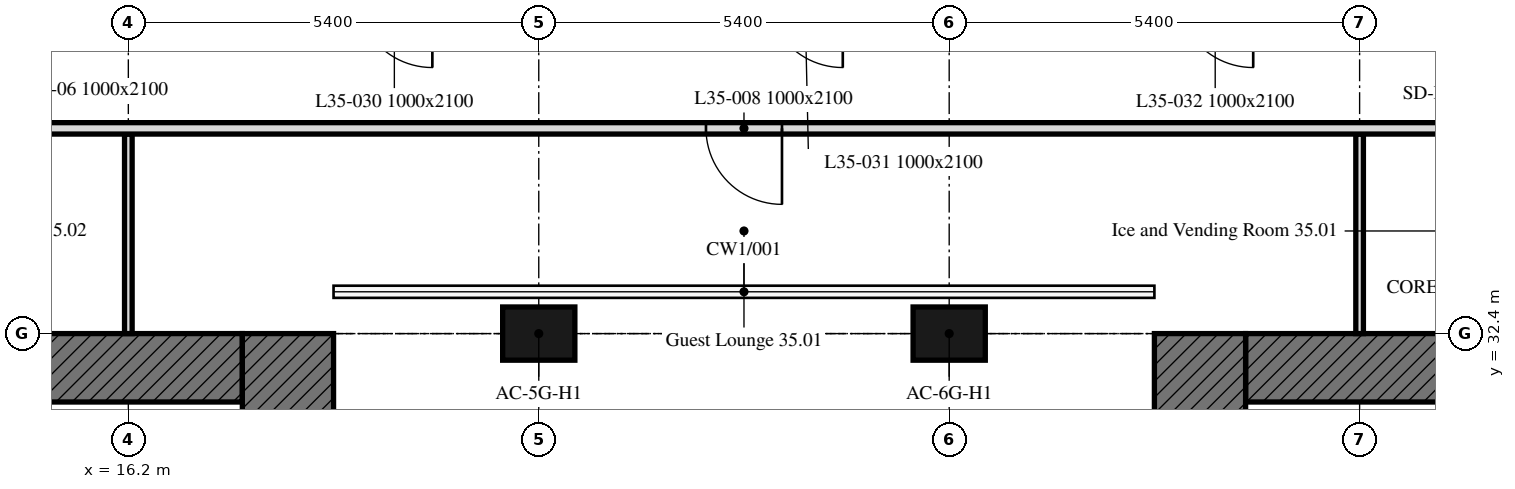
"""IFC4 building model, lengths in metres.
Left out: names, types, materials, properties, quantities, classifications, styles, units other than length and angle.
Written with IfcOpenShell. Run it as: python <this file> out.ifc"""

import sys

from ifc_helpers import new_model, si_unit, direction, frame, frame_2d, origin, origin_2d, place, context, subcontext, project, spatial, rectangle, extrude, element, fill, save


model = new_model("IFC4")
c1 = context("Model", 3, precision=1e-05, world=origin(), true_north=direction((0.0, 1.0)))
c2 = subcontext(c1, "Body", "Model", "MODEL_VIEW")
j1 = project(units=[si_unit("LENGTHUNIT", "METRE"), si_unit("PLANEANGLEUNIT", "RADIAN")], contexts=[c1])
p1 = place(None, origin())
s1 = spatial("IfcSite", under=j1, at=p1, CompositionType="ELEMENT")
p2 = place(p1, origin())
s2 = spatial("IfcBuilding", under=s1, at=p2, CompositionType="ELEMENT")
p3 = place(p2, frame((0.0, 0.0, 152.8)))
s3 = spatial("IfcBuildingStorey", under=s2, at=p3, CompositionType="ELEMENT", Elevation=152.8)
for number, where, z_axis, x_axis in (
    (1, (21.6, 32.4, 0.0), (0.0, 0.0, 1.0), (1.0, 0.0, 0.0)),
    (2, (27.0, 32.4, 0.0), (0.0, 0.0, 1.0), (1.0, 0.0, 0.0)),
):
    element("IfcColumn", number, at=place(p3, frame(where, z_axis=z_axis, x_axis=x_axis)), inside=s3, PredefinedType="COLUMN", context=c2, shape_type="SweptSolid", body=[
        extrude(rectangle(XDim=0.95, YDim=0.7, at=origin_2d()), origin(), (0.0, 0.0, 1.0), 3.0),
    ])
p4 = place(p3, frame((6.6, 31.95, 0.0), z_axis=(0.0, 0.0, 1.0), x_axis=(1.0, 0.0, 0.0)))
e3 = element("IfcWall", 3, at=p4, inside=s3, PredefinedType="SOLIDWALL", context=c2, shape_type="SweptSolid", body=[
    extrude(rectangle(XDim=11.1, YDim=0.9, at=frame_2d((5.55, 0.0))), origin(), (0.0, 0.0, 1.0), 3.0),
])
p5 = place(p4, frame((3.55, 0.0, 0.0)))
e4 = element("IfcOpeningElement", 4, at=p5, cuts=e3, PredefinedType="OPENING", context=c2, shape_type="SweptSolid", body=[
    extrude(rectangle(XDim=2.0, YDim=2.4, at=frame_2d((1.0, 1.2))), frame((0.0, 0.45, 0.0), z_axis=(0.0, -1.0, 0.0), x_axis=(1.0, 0.0, 0.0)), (0.0, 0.0, 1.0), 0.9),
])
p6 = place(p3, frame((18.3, 32.4, 0.0), z_axis=(0.0, 0.0, 1.0), x_axis=(0.0, -1.0, 0.0)))
e5 = element("IfcWall", 5, at=p6, inside=s3, PredefinedType="SOLIDWALL", context=c2, shape_type="SweptSolid", body=[
    extrude(rectangle(XDim=16.2, YDim=1.2, at=frame_2d((8.1, 0.0))), origin(), (0.0, 0.0, 1.0), 3.0),
])
p7 = place(p3, frame((30.9, 31.95, 0.0), z_axis=(0.0, 0.0, 1.0), x_axis=(1.0, 0.0, 0.0)))
e6 = element("IfcWall", 6, at=p7, inside=s3, PredefinedType="SOLIDWALL", context=c2, shape_type="SweptSolid", body=[
    extrude(rectangle(XDim=11.1, YDim=0.9, at=frame_2d((5.55, 0.0))), origin(), (0.0, 0.0, 1.0), 3.0),
])
p8 = place(p7, frame((5.55, 0.0, 0.0)))
e7 = element("IfcOpeningElement", 7, at=p8, cuts=e6, PredefinedType="OPENING", context=c2, shape_type="SweptSolid", body=[
    extrude(rectangle(XDim=2.0, YDim=2.4, at=frame_2d((1.0, 1.2))), frame((0.0, 0.45, 0.0), z_axis=(0.0, -1.0, 0.0), x_axis=(1.0, 0.0, 0.0)), (0.0, 0.0, 1.0), 0.9),
])
p9 = place(p3, frame((30.3, 16.2, 0.0), z_axis=(0.0, 0.0, 1.0), x_axis=(0.0, 1.0, 0.0)))
e8 = element("IfcWall", 8, at=p9, inside=s3, PredefinedType="SOLIDWALL", context=c2, shape_type="SweptSolid", body=[
    extrude(rectangle(XDim=16.2, YDim=1.2, at=frame_2d((8.1, 0.0))), origin(), (0.0, 0.0, 1.0), 3.0),
])
for number, where, z_axis, x_axis in (
    (9, (32.4, 32.4, 0.0), (0.0, 0.0, 1.0), (0.0, 1.0, 0.0)),
    (10, (16.2, 35.025, 0.0), (0.0, 0.0, 1.0), (0.0, -1.0, 0.0)),
):
    element("IfcWall", number, at=place(p3, frame(where, z_axis=z_axis, x_axis=x_axis)), inside=s3, PredefinedType="PARTITIONING", context=c2, shape_type="SweptSolid", body=[
        extrude(rectangle(XDim=2.625, YDim=0.1, at=frame_2d((1.312, 0.0))), origin(), (0.0, 0.0, 1.0), 3.0),
    ])
p10 = place(p3, frame((43.275, 35.1, 0.0), z_axis=(0.0, 0.0, 1.0), x_axis=(-1.0, 0.0, 0.0)))
e11 = element("IfcWall", 11, at=p10, inside=s3, PredefinedType="PARTITIONING", context=c2, shape_type="SweptSolid", body=[
    extrude(rectangle(XDim=37.124, YDim=0.15, at=frame_2d((18.562, 0.0))), origin(), (0.0, 0.0, 1.0), 3.0),
])
p11 = place(p10, frame((18.475, 0.0, 0.0)))
e12 = element("IfcOpeningElement", 12, at=p11, cuts=e11, PredefinedType="OPENING", context=c2, shape_type="SweptSolid", body=[
    extrude(rectangle(XDim=1.0, YDim=2.1, at=frame_2d((0.5, 1.05))), frame((0.0, 0.075, 0.0), z_axis=(0.0, -1.0, 0.0), x_axis=(1.0, 0.0, 0.0)), (0.0, 0.0, 1.0), 0.15),
])
p12 = place(p10, frame((34.095, 0.0, 0.0)))
e13 = element("IfcOpeningElement", 13, at=p12, cuts=e11, PredefinedType="OPENING", context=c2, shape_type="SweptSolid", body=[
    extrude(rectangle(XDim=1.0, YDim=2.1, at=frame_2d((0.5, 1.05))), frame((0.0, 0.075, 0.0), z_axis=(0.0, -1.0, 0.0), x_axis=(1.0, 0.0, 0.0)), (0.0, 0.0, 1.0), 0.15),
])
p13 = place(p10, frame((8.75, 0.0, 0.0)))
e14 = element("IfcOpeningElement", 14, at=p13, cuts=e11, PredefinedType="OPENING", context=c2, shape_type="SweptSolid", body=[
    extrude(rectangle(XDim=1.0, YDim=2.1, at=frame_2d((0.5, 1.05))), frame((0.0, 0.075, 0.0), z_axis=(0.0, -1.0, 0.0), x_axis=(1.0, 0.0, 0.0)), (0.0, 0.0, 1.0), 0.15),
])
p14 = place(p10, frame((1.55, 0.0, 0.0)))
e15 = element("IfcOpeningElement", 15, at=p14, cuts=e11, PredefinedType="OPENING", context=c2, shape_type="SweptSolid", body=[
    extrude(rectangle(XDim=1.0, YDim=2.1, at=frame_2d((0.5, 1.05))), frame((0.0, 0.075, 0.0), z_axis=(0.0, -1.0, 0.0), x_axis=(1.0, 0.0, 0.0)), (0.0, 0.0, 1.0), 0.15),
])
p15 = place(p10, frame((28.2, 0.0, 0.0)))
e16 = element("IfcOpeningElement", 16, at=p15, cuts=e11, PredefinedType="OPENING", context=c2, shape_type="SweptSolid", body=[
    extrude(rectangle(XDim=1.0, YDim=2.1, at=frame_2d((0.5, 1.05))), frame((0.0, 0.075, 0.0), z_axis=(0.0, -1.0, 0.0), x_axis=(1.0, 0.0, 0.0)), (0.0, 0.0, 1.0), 0.15),
])
p16 = place(p10, frame((30.625, 0.0, 0.0)))
e17 = element("IfcOpeningElement", 17, at=p16, cuts=e11, PredefinedType="OPENING", context=c2, shape_type="SweptSolid", body=[
    extrude(rectangle(XDim=1.8, YDim=2.4, at=frame_2d((0.9, 1.2))), frame((0.0, 0.075, 0.0), z_axis=(0.0, -1.0, 0.0), x_axis=(1.0, 0.0, 0.0)), (0.0, 0.0, 1.0), 0.15),
])
p17 = place(p10, frame((5.525, 0.0, 0.0)))
e18 = element("IfcOpeningElement", 18, at=p17, cuts=e11, PredefinedType="OPENING", context=c2, shape_type="SweptSolid", body=[
    extrude(rectangle(XDim=1.8, YDim=2.4, at=frame_2d((0.9, 1.2))), frame((0.0, 0.075, 0.0), z_axis=(0.0, -1.0, 0.0), x_axis=(1.0, 0.0, 0.0)), (0.0, 0.0, 1.0), 0.15),
])
p18 = place(p11, origin())
e19 = element("IfcDoor", 19, at=p18, inside=s3, OperationType="SINGLE_SWING_RIGHT", PredefinedType="DOOR", context=c2, shape_type="SweptSolid", body=[
    extrude(rectangle(XDim=1.0, YDim=2.1, at=frame_2d((0.5, 1.05))), frame((0.0, 0.025, 0.0), z_axis=(0.0, -1.0, 0.0), x_axis=(1.0, 0.0, 0.0)), (0.0, 0.0, 1.0), 0.05),
])
fill(e12, e19)
save(model, sys.argv[1])
